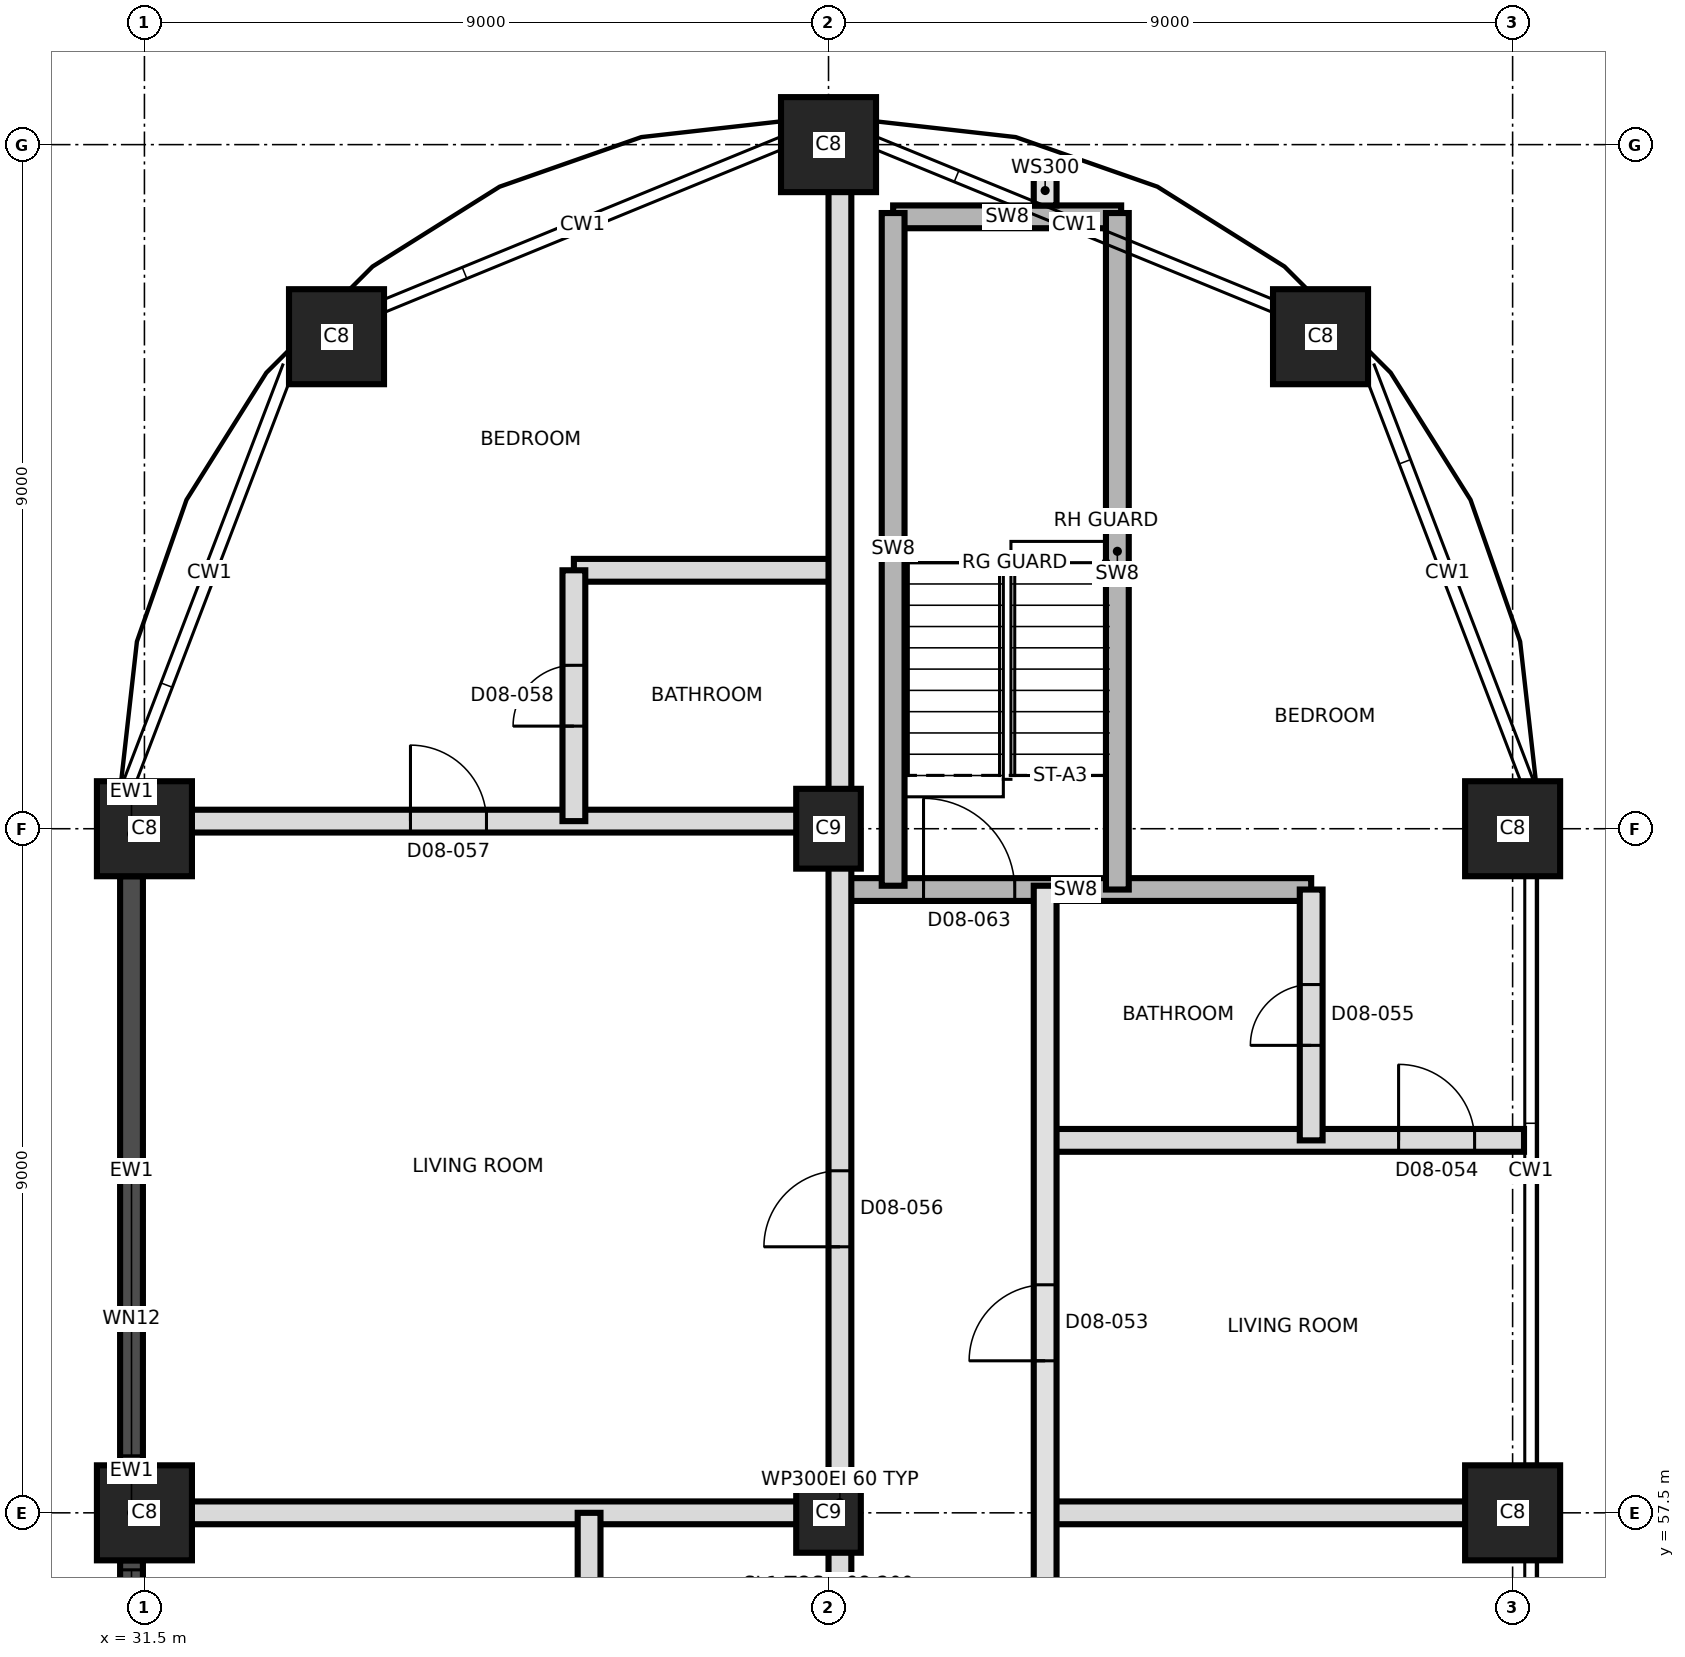
"""IFC4 building model, lengths in metres.
Left out: names, types, materials, properties, quantities, classifications, styles, units other than length and angle.
Written with IfcOpenShell. Run it as: python <this file> out.ifc"""

import sys

from ifc_helpers import new_model, si_unit, direction, frame, frame_2d, origin, origin_2d, place, context, subcontext, project, spatial, rectangle, extrude, element, fill, save


model = new_model("IFC4")
c1 = context("Model", 3, precision=1e-05, world=origin(), true_north=direction((0.0, 1.0)))
c2 = subcontext(c1, "Body", "Model", "MODEL_VIEW")
j1 = project(units=[si_unit("LENGTHUNIT", "METRE"), si_unit("PLANEANGLEUNIT", "RADIAN")], contexts=[c1])
p1 = place(None, origin())
s1 = spatial("IfcSite", under=j1, at=p1, CompositionType="ELEMENT")
p2 = place(p1, origin())
s2 = spatial("IfcBuilding", under=s1, at=p2, CompositionType="ELEMENT")
p3 = place(p2, frame((0.0, 0.0, 98.2)))
s3 = spatial("IfcBuildingStorey", under=s2, at=p3, CompositionType="ELEMENT", Elevation=98.2)
p4 = place(p3, frame((31.5, 57.5, 0.0), z_axis=(0.0, 0.0, 1.0), x_axis=(1.0, 0.0, 0.0)))
e1 = element("IfcColumn", 1, at=p4, inside=s3, PredefinedType="COLUMN", context=c2, shape_type="SweptSolid", body=[
    extrude(rectangle(XDim=1.25, YDim=1.25, at=origin_2d()), origin(), (0.0, 0.0, 1.0), 3.7),
])
p5 = place(p3, frame((40.5, 57.5, 0.0), z_axis=(0.0, 0.0, 1.0), x_axis=(0.0, 1.0, 0.0)))
e2 = element("IfcColumn", 2, at=p5, inside=s3, PredefinedType="COLUMN", context=c2, shape_type="SweptSolid", body=[
    extrude(rectangle(XDim=1.05, YDim=0.85, at=origin_2d()), origin(), (0.0, 0.0, 1.0), 3.7),
])
for number, where, z_axis, x_axis in (
    (3, (49.5, 57.5, 0.0), (0.0, 0.0, 1.0), (1.0, 0.0, 0.0)),
    (4, (31.5, 66.5, 0.0), (0.0, 0.0, 1.0), (1.0, 0.0, 0.0)),
):
    element("IfcColumn", number, at=place(p3, frame(where, z_axis=z_axis, x_axis=x_axis)), inside=s3, PredefinedType="COLUMN", context=c2, shape_type="SweptSolid", body=[
        extrude(rectangle(XDim=1.25, YDim=1.25, at=origin_2d()), origin(), (0.0, 0.0, 1.0), 3.7),
    ])
p6 = place(p3, frame((40.5, 66.5, 0.0), z_axis=(0.0, 0.0, 1.0), x_axis=(0.0, 1.0, 0.0)))
e5 = element("IfcColumn", 5, at=p6, inside=s3, PredefinedType="COLUMN", context=c2, shape_type="SweptSolid", body=[
    extrude(rectangle(XDim=1.05, YDim=0.85, at=origin_2d()), origin(), (0.0, 0.0, 1.0), 3.7),
])
for number, where, z_axis, x_axis in (
    (6, (49.5, 66.5, 0.0), (0.0, 0.0, 1.0), (1.0, 0.0, 0.0)),
    (7, (34.027, 72.973, 0.0), (0.0, 0.0, 1.0), (1.0, 0.0, 0.0)),
    (8, (46.973, 72.973, 0.0), (0.0, 0.0, 1.0), (1.0, 0.0, 0.0)),
    (9, (40.5, 75.5, 0.0), (0.0, 0.0, 1.0), (1.0, 0.0, 0.0)),
):
    element("IfcColumn", number, at=place(p3, frame(where, z_axis=z_axis, x_axis=x_axis)), inside=s3, PredefinedType="COLUMN", context=c2, shape_type="SweptSolid", body=[
        extrude(rectangle(XDim=1.25, YDim=1.25, at=origin_2d()), origin(), (0.0, 0.0, 1.0), 3.7),
    ])
p7 = place(p3, frame((31.33, 66.986, 0.0), z_axis=(0.0, 0.0, 1.0), x_axis=(0.0, -1.0, 0.0)))
e10 = element("IfcWall", 10, at=p7, inside=s3, PredefinedType="SOLIDWALL", context=c2, shape_type="SweptSolid", body=[
    extrude(rectangle(XDim=1.111, YDim=0.3, at=frame_2d((0.556, 0.0))), origin(), (0.0, 0.0, 1.0), 3.4),
])
p8 = place(p3, frame((31.33, 65.875, 0.0), z_axis=(0.0, 0.0, 1.0), x_axis=(0.0, -1.0, 0.0)))
e11 = element("IfcWall", 11, at=p8, inside=s3, PredefinedType="SOLIDWALL", context=c2, shape_type="SweptSolid", body=[
    extrude(rectangle(XDim=7.75, YDim=0.3, at=frame_2d((3.875, 0.0))), origin(), (0.0, 0.0, 1.0), 2.75),
])
p9 = place(p8, frame((4.025, 0.0, 0.9)))
e12 = element("IfcOpeningElement", 12, at=p9, cuts=e11, PredefinedType="OPENING", context=c2, shape_type="SweptSolid", body=[
    extrude(rectangle(XDim=3.6, YDim=1.5, at=frame_2d((1.8, 0.75))), frame((0.0, 0.16, 0.0), z_axis=(0.0, -1.0, 0.0), x_axis=(1.0, 0.0, 0.0)), (0.0, 0.0, 1.0), 0.32),
])
p10 = place(p3, frame((31.33, 58.125, 0.0), z_axis=(0.0, 0.0, 1.0), x_axis=(0.0, -1.0, 0.0)))
e13 = element("IfcWall", 13, at=p10, inside=s3, PredefinedType="SOLIDWALL", context=c2, shape_type="SweptSolid", body=[
    extrude(rectangle(XDim=1.25, YDim=0.3, at=frame_2d((0.625, 0.0))), origin(), (0.0, 0.0, 1.0), 3.4),
])
p11 = place(p3, frame((31.33, 56.875, 0.0), z_axis=(0.0, 0.0, 1.0), x_axis=(0.0, -1.0, 0.0)))
e14 = element("IfcWall", 14, at=p11, inside=s3, PredefinedType="SOLIDWALL", context=c2, shape_type="SweptSolid", body=[
    extrude(rectangle(XDim=7.75, YDim=0.3, at=frame_2d((3.875, 0.0))), origin(), (0.0, 0.0, 1.0), 2.75),
])
p12 = place(p11, frame((0.125, 0.0, 0.9)))
e15 = element("IfcOpeningElement", 15, at=p12, cuts=e14, PredefinedType="OPENING", context=c2, shape_type="SweptSolid", body=[
    extrude(rectangle(XDim=3.6, YDim=1.5, at=frame_2d((1.8, 0.75))), frame((0.0, 0.16, 0.0), z_axis=(0.0, -1.0, 0.0), x_axis=(1.0, 0.0, 0.0)), (0.0, 0.0, 1.0), 0.32),
])
p13 = place(p11, frame((4.025, 0.0, 0.9)))
e16 = element("IfcOpeningElement", 16, at=p13, cuts=e14, PredefinedType="OPENING", context=c2, shape_type="SweptSolid", body=[
    extrude(rectangle(XDim=3.6, YDim=1.5, at=frame_2d((1.8, 0.75))), frame((0.0, 0.16, 0.0), z_axis=(0.0, -1.0, 0.0), x_axis=(1.0, 0.0, 0.0)), (0.0, 0.0, 1.0), 0.32),
])
p14 = place(p3, frame((31.53, 57.5, 0.0), z_axis=(0.0, 0.0, 1.0), x_axis=(1.0, 0.0, 0.0)))
e17 = element("IfcWall", 17, at=p14, inside=s3, PredefinedType="PARTITIONING", context=c2, shape_type="SweptSolid", body=[
    extrude(rectangle(XDim=9.12, YDim=0.3, at=frame_2d((4.56, 0.0))), origin(), (0.0, 0.0, 1.0), 3.4),
])
p15 = place(p3, frame((43.35, 57.5, 0.0), z_axis=(0.0, 0.0, 1.0), x_axis=(1.0, 0.0, 0.0)))
e18 = element("IfcWall", 18, at=p15, inside=s3, PredefinedType="PARTITIONING", context=c2, shape_type="SweptSolid", body=[
    extrude(rectangle(XDim=6.12, YDim=0.3, at=frame_2d((3.06, 0.0))), origin(), (0.0, 0.0, 1.0), 3.4),
])
p16 = place(p3, frame((43.35, 62.4, 0.0), z_axis=(0.0, 0.0, 1.0), x_axis=(1.0, 0.0, 0.0)))
e19 = element("IfcWall", 19, at=p16, inside=s3, PredefinedType="PARTITIONING", context=c2, shape_type="SweptSolid", body=[
    extrude(rectangle(XDim=6.3, YDim=0.3, at=frame_2d((3.15, 0.0))), origin(), (0.0, 0.0, 1.0), 3.4),
])
p17 = place(p16, frame((4.65, 0.0, 0.0)))
e20 = element("IfcOpeningElement", 20, at=p17, cuts=e19, PredefinedType="OPENING", context=c2, shape_type="SweptSolid", body=[
    extrude(rectangle(XDim=1.0, YDim=2.1, at=frame_2d((0.5, 1.05))), frame((0.0, 0.16, 0.0), z_axis=(0.0, -1.0, 0.0), x_axis=(1.0, 0.0, 0.0)), (0.0, 0.0, 1.0), 0.32),
])
p18 = place(p3, frame((40.65, 65.7, 0.0), z_axis=(0.0, 0.0, 1.0), x_axis=(1.0, 0.0, 0.0)))
e21 = element("IfcWall", 21, at=p18, inside=s3, PredefinedType="SHEAR", context=c2, shape_type="SweptSolid", body=[
    extrude(rectangle(XDim=6.2, YDim=0.3, at=frame_2d((3.1, 0.0))), origin(), (0.0, 0.0, 1.0), 3.4),
])
p19 = place(p18, frame((1.1, 0.0, 0.0)))
e22 = element("IfcOpeningElement", 22, at=p19, cuts=e21, PredefinedType="OPENING", context=c2, shape_type="SweptSolid", body=[
    extrude(rectangle(XDim=1.2, YDim=2.1, at=frame_2d((0.6, 1.05))), frame((0.0, 0.16, 0.0), z_axis=(0.0, -1.0, 0.0), x_axis=(1.0, 0.0, 0.0)), (0.0, 0.0, 1.0), 0.32),
])
p20 = place(p3, frame((31.53, 66.6, 0.0), z_axis=(0.0, 0.0, 1.0), x_axis=(1.0, 0.0, 0.0)))
e23 = element("IfcWall", 23, at=p20, inside=s3, PredefinedType="PARTITIONING", context=c2, shape_type="SweptSolid", body=[
    extrude(rectangle(XDim=9.12, YDim=0.3, at=frame_2d((4.56, 0.0))), origin(), (0.0, 0.0, 1.0), 3.4),
])
p21 = place(p20, frame((3.47, 0.0, 0.0)))
e24 = element("IfcOpeningElement", 24, at=p21, cuts=e23, PredefinedType="OPENING", context=c2, shape_type="SweptSolid", body=[
    extrude(rectangle(XDim=1.0, YDim=2.1, at=frame_2d((0.5, 1.05))), frame((0.0, 0.16, 0.0), z_axis=(0.0, -1.0, 0.0), x_axis=(1.0, 0.0, 0.0)), (0.0, 0.0, 1.0), 0.32),
])
p22 = place(p3, frame((37.15, 69.9, 0.0), z_axis=(0.0, 0.0, 1.0), x_axis=(1.0, 0.0, 0.0)))
e25 = element("IfcWall", 25, at=p22, inside=s3, PredefinedType="PARTITIONING", context=c2, shape_type="SweptSolid", body=[
    extrude(rectangle(XDim=3.5, YDim=0.3, at=frame_2d((1.75, 0.0))), origin(), (0.0, 0.0, 1.0), 3.4),
])
p23 = place(p3, frame((41.35, 74.55, 0.0), z_axis=(0.0, 0.0, 1.0), x_axis=(1.0, 0.0, 0.0)))
e26 = element("IfcWall", 26, at=p23, inside=s3, PredefinedType="SHEAR", context=c2, shape_type="SweptSolid", body=[
    extrude(rectangle(XDim=3.0, YDim=0.3, at=frame_2d((1.5, 0.0))), origin(), (0.0, 0.0, 1.0), 3.4),
])
p24 = place(p3, frame((37.15, 66.6, 0.0), z_axis=(0.0, 0.0, 1.0), x_axis=(0.0, 1.0, 0.0)))
e27 = element("IfcWall", 27, at=p24, inside=s3, PredefinedType="PARTITIONING", context=c2, shape_type="SweptSolid", body=[
    extrude(rectangle(XDim=3.3, YDim=0.3, at=frame_2d((1.65, 0.0))), origin(), (0.0, 0.0, 1.0), 3.4),
])
p25 = place(p24, frame((1.25, 0.0, 0.0)))
e28 = element("IfcOpeningElement", 28, at=p25, cuts=e27, PredefinedType="OPENING", context=c2, shape_type="SweptSolid", body=[
    extrude(rectangle(XDim=0.8, YDim=2.1, at=frame_2d((0.4, 1.05))), frame((0.0, 0.16, 0.0), z_axis=(0.0, -1.0, 0.0), x_axis=(1.0, 0.0, 0.0)), (0.0, 0.0, 1.0), 0.32),
])
p26 = place(p3, frame((37.35, 54.5, 0.0), z_axis=(0.0, 0.0, 1.0), x_axis=(0.0, 1.0, 0.0)))
e29 = element("IfcWall", 29, at=p26, inside=s3, PredefinedType="PARTITIONING", context=c2, shape_type="SweptSolid", body=[
    extrude(rectangle(XDim=3.0, YDim=0.3, at=frame_2d((1.5, 0.0))), origin(), (0.0, 0.0, 1.0), 3.4),
])
p27 = place(p26, frame((1.1, 0.0, 0.0)))
e30 = element("IfcOpeningElement", 30, at=p27, cuts=e29, PredefinedType="OPENING", context=c2, shape_type="SweptSolid", body=[
    extrude(rectangle(XDim=0.8, YDim=2.1, at=frame_2d((0.4, 1.05))), frame((0.0, 0.16, 0.0), z_axis=(0.0, -1.0, 0.0), x_axis=(1.0, 0.0, 0.0)), (0.0, 0.0, 1.0), 0.32),
])
p28 = place(p3, frame((40.65, 39.8, 0.0), z_axis=(0.0, 0.0, 1.0), x_axis=(0.0, 1.0, 0.0)))
e31 = element("IfcWall", 31, at=p28, inside=s3, PredefinedType="PARTITIONING", context=c2, shape_type="SweptSolid", body=[
    extrude(rectangle(XDim=35.67, YDim=0.3, at=frame_2d((17.835, 0.0))), origin(), (0.0, 0.0, 1.0), 3.4),
])
p29 = place(p28, frame((3.7, 0.0, 0.0)))
e32 = element("IfcOpeningElement", 32, at=p29, cuts=e31, PredefinedType="OPENING", context=c2, shape_type="SweptSolid", body=[
    extrude(rectangle(XDim=1.0, YDim=2.4, at=frame_2d((0.5, 1.2))), frame((0.0, 0.16, 0.0), z_axis=(0.0, -1.0, 0.0), x_axis=(1.0, 0.0, 0.0)), (0.0, 0.0, 1.0), 0.32),
])
p30 = place(p28, frame((12.7, 0.0, 0.0)))
e33 = element("IfcOpeningElement", 33, at=p30, cuts=e31, PredefinedType="OPENING", context=c2, shape_type="SweptSolid", body=[
    extrude(rectangle(XDim=1.0, YDim=2.4, at=frame_2d((0.5, 1.2))), frame((0.0, 0.16, 0.0), z_axis=(0.0, -1.0, 0.0), x_axis=(1.0, 0.0, 0.0)), (0.0, 0.0, 1.0), 0.32),
])
p31 = place(p28, frame((21.2, 0.0, 0.0)))
e34 = element("IfcOpeningElement", 34, at=p31, cuts=e31, PredefinedType="OPENING", context=c2, shape_type="SweptSolid", body=[
    extrude(rectangle(XDim=1.0, YDim=2.4, at=frame_2d((0.5, 1.2))), frame((0.0, 0.16, 0.0), z_axis=(0.0, -1.0, 0.0), x_axis=(1.0, 0.0, 0.0)), (0.0, 0.0, 1.0), 0.32),
])
p32 = place(p3, frame((41.35, 65.75, 0.0), z_axis=(0.0, 0.0, 1.0), x_axis=(0.0, 1.0, 0.0)))
e35 = element("IfcWall", 35, at=p32, inside=s3, PredefinedType="SHEAR", context=c2, shape_type="SweptSolid", body=[
    extrude(rectangle(XDim=8.85, YDim=0.3, at=frame_2d((4.425, 0.0))), origin(), (0.0, 0.0, 1.0), 3.4),
])
p33 = place(p3, frame((43.35, 39.8, 0.0), z_axis=(0.0, 0.0, 1.0), x_axis=(0.0, 1.0, 0.0)))
e36 = element("IfcWall", 36, at=p33, inside=s3, PredefinedType="SOLIDWALL", context=c2, shape_type="SweptSolid", body=[
    extrude(rectangle(XDim=25.95, YDim=0.3, at=frame_2d((12.975, 0.0))), origin(), (0.0, 0.0, 1.0), 3.4),
])
p34 = place(p33, frame((2.95, 0.0, 0.0)))
e37 = element("IfcOpeningElement", 37, at=p34, cuts=e36, PredefinedType="OPENING", context=c2, shape_type="SweptSolid", body=[
    extrude(rectangle(XDim=1.0, YDim=2.1, at=frame_2d((0.5, 1.05))), frame((0.0, 0.16, 0.0), z_axis=(0.0, -1.0, 0.0), x_axis=(1.0, 0.0, 0.0)), (0.0, 0.0, 1.0), 0.32),
])
p35 = place(p33, frame((4.6, 0.0, 0.0)))
e38 = element("IfcOpeningElement", 38, at=p35, cuts=e36, PredefinedType="OPENING", context=c2, shape_type="SweptSolid", body=[
    extrude(rectangle(XDim=1.0, YDim=2.1, at=frame_2d((0.5, 1.05))), frame((0.0, 0.16, 0.0), z_axis=(0.0, -1.0, 0.0), x_axis=(1.0, 0.0, 0.0)), (0.0, 0.0, 1.0), 0.32),
])
p36 = place(p33, frame((14.35, 0.0, 0.0)))
e39 = element("IfcOpeningElement", 39, at=p36, cuts=e36, PredefinedType="OPENING", context=c2, shape_type="SweptSolid", body=[
    extrude(rectangle(XDim=1.0, YDim=2.4, at=frame_2d((0.5, 1.2))), frame((0.0, 0.16, 0.0), z_axis=(0.0, -1.0, 0.0), x_axis=(1.0, 0.0, 0.0)), (0.0, 0.0, 1.0), 0.32),
])
p37 = place(p33, frame((19.7, 0.0, 0.0)))
e40 = element("IfcOpeningElement", 40, at=p37, cuts=e36, PredefinedType="OPENING", context=c2, shape_type="SweptSolid", body=[
    extrude(rectangle(XDim=1.0, YDim=2.4, at=frame_2d((0.5, 1.2))), frame((0.0, 0.16, 0.0), z_axis=(0.0, -1.0, 0.0), x_axis=(1.0, 0.0, 0.0)), (0.0, 0.0, 1.0), 0.32),
])
p38 = place(p3, frame((43.35, 74.699, 0.0), z_axis=(0.0, 0.0, 1.0), x_axis=(0.0, 1.0, 0.0)))
e41 = element("IfcWall", 41, at=p38, inside=s3, PredefinedType="SOLIDWALL", context=c2, shape_type="SweptSolid", body=[
    extrude(rectangle(XDim=0.394, YDim=0.3, at=frame_2d((0.197, 0.0))), origin(), (0.0, 0.0, 1.0), 3.4),
])
p39 = place(p3, frame((44.3, 65.7, 0.0), z_axis=(0.0, 0.0, 1.0), x_axis=(0.0, 1.0, 0.0)))
e42 = element("IfcWall", 42, at=p39, inside=s3, PredefinedType="SHEAR", context=c2, shape_type="SweptSolid", body=[
    extrude(rectangle(XDim=8.9, YDim=0.3, at=frame_2d((4.45, 0.0))), origin(), (0.0, 0.0, 1.0), 3.4),
])
p40 = place(p3, frame((46.85, 62.4, 0.0), z_axis=(0.0, 0.0, 1.0), x_axis=(0.0, 1.0, 0.0)))
e43 = element("IfcWall", 43, at=p40, inside=s3, PredefinedType="PARTITIONING", context=c2, shape_type="SweptSolid", body=[
    extrude(rectangle(XDim=3.3, YDim=0.3, at=frame_2d((1.65, 0.0))), origin(), (0.0, 0.0, 1.0), 3.4),
])
p41 = place(p40, frame((1.25, 0.0, 0.0)))
e44 = element("IfcOpeningElement", 44, at=p41, cuts=e43, PredefinedType="OPENING", context=c2, shape_type="SweptSolid", body=[
    extrude(rectangle(XDim=0.8, YDim=2.1, at=frame_2d((0.4, 1.05))), frame((0.0, 0.16, 0.0), z_axis=(0.0, -1.0, 0.0), x_axis=(1.0, 0.0, 0.0)), (0.0, 0.0, 1.0), 0.32),
])
p42 = place(p9, origin())
e45 = element("IfcWindow", 45, at=p42, inside=s3, PartitioningType="SINGLE_PANEL", PredefinedType="WINDOW", context=c2, shape_type="SweptSolid", body=[
    extrude(rectangle(XDim=3.6, YDim=1.5, at=frame_2d((1.8, 0.75))), frame((0.0, 0.03, 0.0), z_axis=(0.0, -1.0, 0.0), x_axis=(1.0, 0.0, 0.0)), (0.0, 0.0, 1.0), 0.06),
])
fill(e12, e45)
p43 = place(p12, origin())
e46 = element("IfcWindow", 46, at=p43, inside=s3, PartitioningType="SINGLE_PANEL", PredefinedType="WINDOW", context=c2, shape_type="SweptSolid", body=[
    extrude(rectangle(XDim=3.6, YDim=1.5, at=frame_2d((1.8, 0.75))), frame((0.0, 0.03, 0.0), z_axis=(0.0, -1.0, 0.0), x_axis=(1.0, 0.0, 0.0)), (0.0, 0.0, 1.0), 0.06),
])
fill(e15, e46)
p44 = place(p37, origin())
e47 = element("IfcDoor", 47, at=p44, inside=s3, OperationType="SINGLE_SWING_LEFT", PredefinedType="DOOR", context=c2, shape_type="SweptSolid", body=[
    extrude(rectangle(XDim=1.0, YDim=2.4, at=frame_2d((0.5, 1.2))), frame((0.0, 0.025, 0.0), z_axis=(0.0, -1.0, 0.0), x_axis=(1.0, 0.0, 0.0)), (0.0, 0.0, 1.0), 0.05),
])
fill(e40, e47)
p45 = place(p17, origin())
e48 = element("IfcDoor", 48, at=p45, inside=s3, OperationType="SINGLE_SWING_RIGHT", PredefinedType="DOOR", context=c2, shape_type="SweptSolid", body=[
    extrude(rectangle(XDim=1.0, YDim=2.1, at=frame_2d((0.5, 1.05))), frame((0.0, 0.025, 0.0), z_axis=(0.0, -1.0, 0.0), x_axis=(1.0, 0.0, 0.0)), (0.0, 0.0, 1.0), 0.05),
])
fill(e20, e48)
p46 = place(p41, origin())
e49 = element("IfcDoor", 49, at=p46, inside=s3, OperationType="SINGLE_SWING_LEFT", PredefinedType="DOOR", context=c2, shape_type="SweptSolid", body=[
    extrude(rectangle(XDim=0.8, YDim=2.1, at=frame_2d((0.4, 1.05))), frame((0.0, 0.025, 0.0), z_axis=(0.0, -1.0, 0.0), x_axis=(1.0, 0.0, 0.0)), (0.0, 0.0, 1.0), 0.05),
])
fill(e44, e49)
p47 = place(p31, origin())
e50 = element("IfcDoor", 50, at=p47, inside=s3, OperationType="SINGLE_SWING_LEFT", PredefinedType="DOOR", context=c2, shape_type="SweptSolid", body=[
    extrude(rectangle(XDim=1.0, YDim=2.4, at=frame_2d((0.5, 1.2))), frame((0.0, 0.025, 0.0), z_axis=(0.0, -1.0, 0.0), x_axis=(1.0, 0.0, 0.0)), (0.0, 0.0, 1.0), 0.05),
])
fill(e34, e50)
p48 = place(p21, origin())
e51 = element("IfcDoor", 51, at=p48, inside=s3, OperationType="SINGLE_SWING_RIGHT", PredefinedType="DOOR", context=c2, shape_type="SweptSolid", body=[
    extrude(rectangle(XDim=1.0, YDim=2.1, at=frame_2d((0.5, 1.05))), frame((0.0, 0.025, 0.0), z_axis=(0.0, -1.0, 0.0), x_axis=(1.0, 0.0, 0.0)), (0.0, 0.0, 1.0), 0.05),
])
fill(e24, e51)
p49 = place(p25, origin())
e52 = element("IfcDoor", 52, at=p49, inside=s3, OperationType="SINGLE_SWING_LEFT", PredefinedType="DOOR", context=c2, shape_type="SweptSolid", body=[
    extrude(rectangle(XDim=0.8, YDim=2.1, at=frame_2d((0.4, 1.05))), frame((0.0, 0.025, 0.0), z_axis=(0.0, -1.0, 0.0), x_axis=(1.0, 0.0, 0.0)), (0.0, 0.0, 1.0), 0.05),
])
fill(e28, e52)
p50 = place(p19, origin())
e53 = element("IfcDoor", 53, at=p50, inside=s3, OperationType="SINGLE_SWING_RIGHT", PredefinedType="DOOR", context=c2, shape_type="SweptSolid", body=[
    extrude(rectangle(XDim=1.2, YDim=2.1, at=frame_2d((0.6, 1.05))), frame((0.0, 0.025, 0.0), z_axis=(0.0, -1.0, 0.0), x_axis=(1.0, 0.0, 0.0)), (0.0, 0.0, 1.0), 0.05),
])
fill(e22, e53)
save(model, sys.argv[1])
